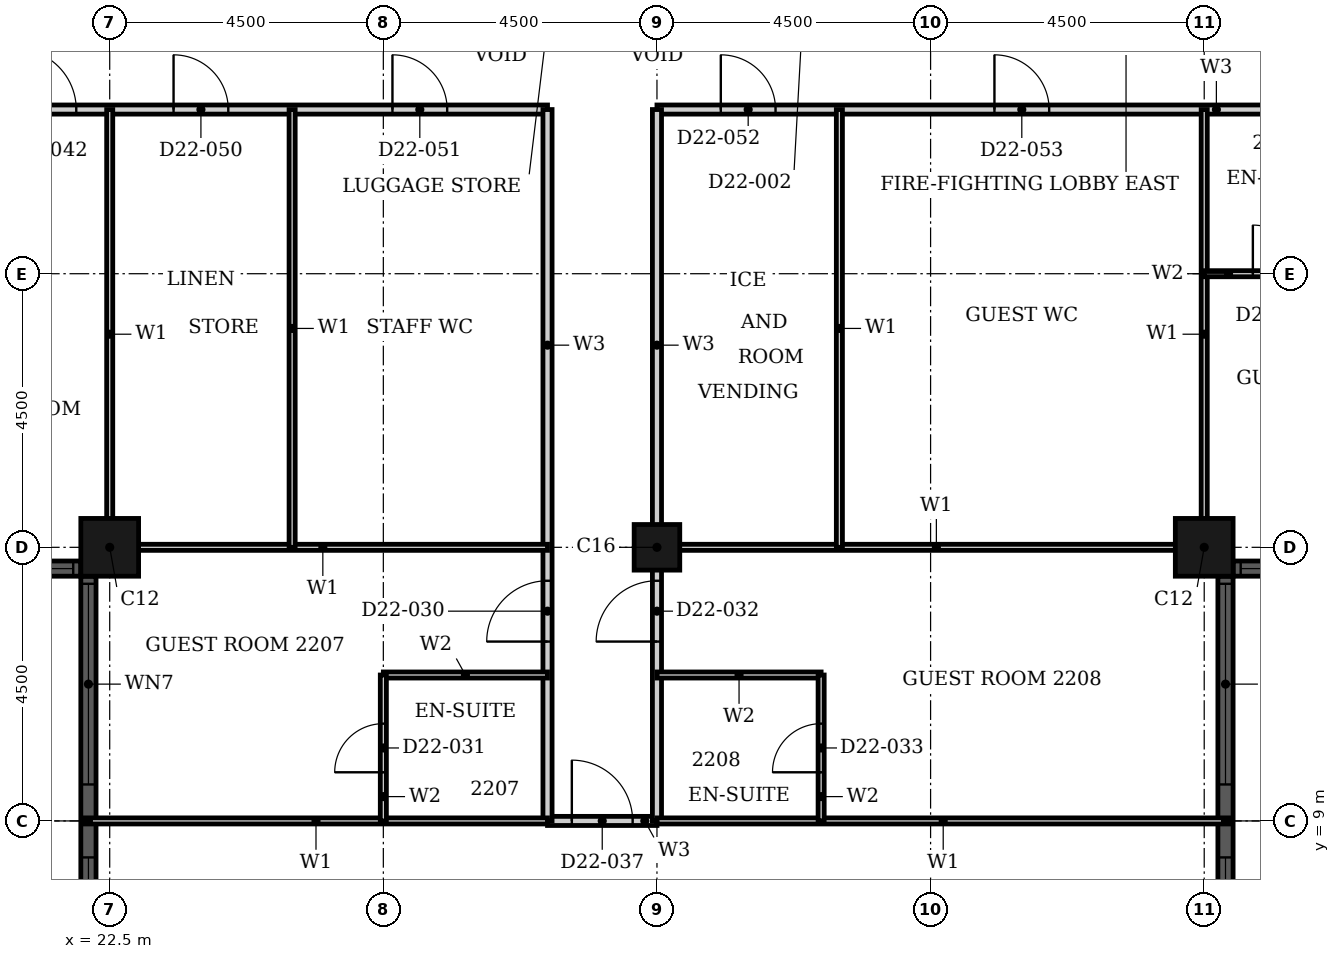
"""IFC4 building model, lengths in metres.
Left out: names, types, materials, properties, quantities, classifications, styles, units other than length and angle.
Written with IfcOpenShell. Run it as: python <this file> out.ifc"""

import sys

from ifc_helpers import new_model, si_unit, direction, frame, frame_2d, origin, origin_2d, place, context, subcontext, project, spatial, rectangle, hollow_rectangle, extrude, element, fill, save


model = new_model("IFC4")
c1 = context("Model", 3, precision=1e-05, world=origin(), true_north=direction((0.0, 1.0)))
c2 = subcontext(c1, "Body", "Model", "MODEL_VIEW")
j1 = project(units=[si_unit("LENGTHUNIT", "METRE"), si_unit("PLANEANGLEUNIT", "RADIAN")], contexts=[c1])
p1 = place(None, origin())
s1 = spatial("IfcSite", under=j1, at=p1, CompositionType="ELEMENT")
p2 = place(p1, origin())
s2 = spatial("IfcBuilding", under=s1, at=p2, CompositionType="ELEMENT")
p3 = place(p2, frame((0.0, 0.0, 92.4)))
s3 = spatial("IfcBuildingStorey", under=s2, at=p3, CompositionType="ELEMENT", Elevation=92.4)
for number, where, z_axis, x_axis in (
    (1, (40.5, 13.5, 0.0), (0.0, 0.0, 1.0), (1.0, 0.0, 0.0)),
    (2, (22.5, 13.5, 0.0), (0.0, 0.0, 1.0), (1.0, 0.0, 0.0)),
):
    element("IfcColumn", number, at=place(p3, frame(where, z_axis=z_axis, x_axis=x_axis)), inside=s3, PredefinedType="COLUMN", context=c2, shape_type="SweptSolid", body=[
        extrude(hollow_rectangle(XDim=0.95, YDim=0.95, WallThickness=0.03, at=origin_2d()), origin(), (0.0, 0.0, 1.0), 3.6),
    ])
p4 = place(p3, frame((31.5, 13.5, 0.0), z_axis=(0.0, 0.0, 1.0), x_axis=(1.0, 0.0, 0.0)))
e3 = element("IfcColumn", 3, at=p4, inside=s3, PredefinedType="COLUMN", context=c2, shape_type="SweptSolid", body=[
    extrude(hollow_rectangle(XDim=0.75, YDim=0.75, WallThickness=0.024, at=origin_2d()), origin(), (0.0, 0.0, 1.0), 3.6),
])
p5 = place(p3, frame((40.85, 4.975, 0.0), z_axis=(0.0, 0.0, 1.0), x_axis=(0.0, 1.0, 0.0)))
e4 = element("IfcWall", 4, at=p5, inside=s3, PredefinedType="SOLIDWALL", context=c2, shape_type="SweptSolid", body=[
    extrude(rectangle(XDim=8.05, YDim=0.25, at=frame_2d((4.025, 0.0))), origin(), (0.0, 0.0, 1.0), 3.6),
])
p6 = place(p5, frame((0.125, 0.0, 0.9)))
e5 = element("IfcOpeningElement", 5, at=p6, cuts=e4, PredefinedType="OPENING", context=c2, shape_type="SweptSolid", body=[
    extrude(rectangle(XDim=3.3, YDim=1.85, at=frame_2d((1.65, 0.925))), frame((0.0, 0.135, 0.0), z_axis=(0.0, -1.0, 0.0), x_axis=(1.0, 0.0, 0.0)), (0.0, 0.0, 1.0), 0.27),
])
p7 = place(p5, frame((4.625, 0.0, 0.9)))
e6 = element("IfcOpeningElement", 6, at=p7, cuts=e4, PredefinedType="OPENING", context=c2, shape_type="SweptSolid", body=[
    extrude(rectangle(XDim=3.3, YDim=1.85, at=frame_2d((1.65, 0.925))), frame((0.0, 0.135, 0.0), z_axis=(0.0, -1.0, 0.0), x_axis=(1.0, 0.0, 0.0)), (0.0, 0.0, 1.0), 0.27),
])
p8 = place(p3, frame((40.975, 13.15, 0.0), z_axis=(0.0, 0.0, 1.0), x_axis=(1.0, 0.0, 0.0)))
e7 = element("IfcWall", 7, at=p8, inside=s3, PredefinedType="SOLIDWALL", context=c2, shape_type="SweptSolid", body=[
    extrude(rectangle(XDim=3.55, YDim=0.25, at=frame_2d((1.775, 0.0))), origin(), (0.0, 0.0, 1.0), 3.6),
])
p9 = place(p8, frame((0.125, 0.0, 0.9)))
e8 = element("IfcOpeningElement", 8, at=p9, cuts=e7, PredefinedType="OPENING", context=c2, shape_type="SweptSolid", body=[
    extrude(rectangle(XDim=3.3, YDim=1.85, at=frame_2d((1.65, 0.925))), frame((0.0, 0.135, 0.0), z_axis=(0.0, -1.0, 0.0), x_axis=(1.0, 0.0, 0.0)), (0.0, 0.0, 1.0), 0.27),
])
p10 = place(p3, frame((18.475, 13.15, 0.0), z_axis=(0.0, 0.0, 1.0), x_axis=(1.0, 0.0, 0.0)))
e9 = element("IfcWall", 9, at=p10, inside=s3, PredefinedType="SOLIDWALL", context=c2, shape_type="SweptSolid", body=[
    extrude(rectangle(XDim=3.55, YDim=0.25, at=frame_2d((1.775, 0.0))), origin(), (0.0, 0.0, 1.0), 3.6),
])
p11 = place(p10, frame((0.125, 0.0, 0.9)))
e10 = element("IfcOpeningElement", 10, at=p11, cuts=e9, PredefinedType="OPENING", context=c2, shape_type="SweptSolid", body=[
    extrude(rectangle(XDim=3.3, YDim=1.85, at=frame_2d((1.65, 0.925))), frame((0.0, 0.135, 0.0), z_axis=(0.0, -1.0, 0.0), x_axis=(1.0, 0.0, 0.0)), (0.0, 0.0, 1.0), 0.27),
])
p12 = place(p3, frame((22.15, 13.025, 0.0), z_axis=(0.0, 0.0, 1.0), x_axis=(0.0, -1.0, 0.0)))
e11 = element("IfcWall", 11, at=p12, inside=s3, PredefinedType="SOLIDWALL", context=c2, shape_type="SweptSolid", body=[
    extrude(rectangle(XDim=8.05, YDim=0.25, at=frame_2d((4.025, 0.0))), origin(), (0.0, 0.0, 1.0), 3.6),
])
p13 = place(p12, frame((0.125, 0.0, 0.9)))
e12 = element("IfcOpeningElement", 12, at=p13, cuts=e11, PredefinedType="OPENING", context=c2, shape_type="SweptSolid", body=[
    extrude(rectangle(XDim=3.3, YDim=1.85, at=frame_2d((1.65, 0.925))), frame((0.0, 0.135, 0.0), z_axis=(0.0, -1.0, 0.0), x_axis=(1.0, 0.0, 0.0)), (0.0, 0.0, 1.0), 0.27),
])
p14 = place(p12, frame((4.625, 0.0, 0.9)))
e13 = element("IfcOpeningElement", 13, at=p14, cuts=e11, PredefinedType="OPENING", context=c2, shape_type="SweptSolid", body=[
    extrude(rectangle(XDim=3.3, YDim=1.85, at=frame_2d((1.65, 0.925))), frame((0.0, 0.135, 0.0), z_axis=(0.0, -1.0, 0.0), x_axis=(1.0, 0.0, 0.0)), (0.0, 0.0, 1.0), 0.27),
])
p15 = place(p3, frame((31.5, 20.7, 0.0), z_axis=(0.0, 0.0, 1.0), x_axis=(1.0, 0.0, 0.0)))
e14 = element("IfcWall", 14, at=p15, inside=s3, PredefinedType="PARTITIONING", context=c2, shape_type="SweptSolid", body=[
    extrude(rectangle(XDim=13.5, YDim=0.15, at=frame_2d((6.75, 0.0))), origin(), (0.0, 0.0, 1.0), 3.2),
])
p16 = place(p15, frame((11.95, 0.0, 0.0)))
e15 = element("IfcOpeningElement", 15, at=p16, cuts=e14, PredefinedType="OPENING", context=c2, shape_type="SweptSolid", body=[
    extrude(rectangle(XDim=1.0, YDim=2.1, at=frame_2d((0.5, 1.05))), frame((0.0, 0.085, 0.0), z_axis=(0.0, -1.0, 0.0), x_axis=(1.0, 0.0, 0.0)), (0.0, 0.0, 1.0), 0.17),
])
p17 = place(p15, frame((1.05, 0.0, 0.0)))
e16 = element("IfcOpeningElement", 16, at=p17, cuts=e14, PredefinedType="OPENING", context=c2, shape_type="SweptSolid", body=[
    extrude(rectangle(XDim=0.9, YDim=2.1, at=frame_2d((0.45, 1.05))), frame((0.0, 0.085, 0.0), z_axis=(0.0, -1.0, 0.0), x_axis=(1.0, 0.0, 0.0)), (0.0, 0.0, 1.0), 0.17),
])
p18 = place(p15, frame((5.55, 0.0, 0.0)))
e17 = element("IfcOpeningElement", 17, at=p18, cuts=e14, PredefinedType="OPENING", context=c2, shape_type="SweptSolid", body=[
    extrude(rectangle(XDim=0.9, YDim=2.1, at=frame_2d((0.45, 1.05))), frame((0.0, 0.085, 0.0), z_axis=(0.0, -1.0, 0.0), x_axis=(1.0, 0.0, 0.0)), (0.0, 0.0, 1.0), 0.17),
])
p19 = place(p3, frame((16.2, 20.7, 0.0), z_axis=(0.0, 0.0, 1.0), x_axis=(1.0, 0.0, 0.0)))
e18 = element("IfcWall", 18, at=p19, inside=s3, PredefinedType="PARTITIONING", context=c2, shape_type="SweptSolid", body=[
    extrude(rectangle(XDim=13.5, YDim=0.15, at=frame_2d((6.75, 0.0))), origin(), (0.0, 0.0, 1.0), 3.2),
])
p20 = place(p19, frame((4.75, 0.0, 0.0)))
e19 = element("IfcOpeningElement", 19, at=p20, cuts=e18, PredefinedType="OPENING", context=c2, shape_type="SweptSolid", body=[
    extrude(rectangle(XDim=1.0, YDim=2.1, at=frame_2d((0.5, 1.05))), frame((0.0, 0.085, 0.0), z_axis=(0.0, -1.0, 0.0), x_axis=(1.0, 0.0, 0.0)), (0.0, 0.0, 1.0), 0.17),
])
p21 = place(p19, frame((0.45, 0.0, 0.0)))
e20 = element("IfcOpeningElement", 20, at=p21, cuts=e18, PredefinedType="OPENING", context=c2, shape_type="SweptSolid", body=[
    extrude(rectangle(XDim=0.9, YDim=2.1, at=frame_2d((0.45, 1.05))), frame((0.0, 0.085, 0.0), z_axis=(0.0, -1.0, 0.0), x_axis=(1.0, 0.0, 0.0)), (0.0, 0.0, 1.0), 0.17),
])
p22 = place(p19, frame((7.35, 0.0, 0.0)))
e21 = element("IfcOpeningElement", 21, at=p22, cuts=e18, PredefinedType="OPENING", context=c2, shape_type="SweptSolid", body=[
    extrude(rectangle(XDim=0.9, YDim=2.1, at=frame_2d((0.45, 1.05))), frame((0.0, 0.085, 0.0), z_axis=(0.0, -1.0, 0.0), x_axis=(1.0, 0.0, 0.0)), (0.0, 0.0, 1.0), 0.17),
])
p23 = place(p19, frame((10.95, 0.0, 0.0)))
e22 = element("IfcOpeningElement", 22, at=p23, cuts=e18, PredefinedType="OPENING", context=c2, shape_type="SweptSolid", body=[
    extrude(rectangle(XDim=0.9, YDim=2.1, at=frame_2d((0.45, 1.05))), frame((0.0, 0.085, 0.0), z_axis=(0.0, -1.0, 0.0), x_axis=(1.0, 0.0, 0.0)), (0.0, 0.0, 1.0), 0.17),
])
p24 = place(p3, frame((29.7, 9.0, 0.0), z_axis=(0.0, 0.0, 1.0), x_axis=(1.0, 0.0, 0.0)))
e23 = element("IfcWall", 23, at=p24, inside=s3, PredefinedType="PARTITIONING", context=c2, shape_type="SweptSolid", body=[
    extrude(rectangle(XDim=1.8, YDim=0.15, at=frame_2d((0.9, 0.0))), origin(), (0.0, 0.0, 1.0), 3.2),
])
p25 = place(p24, frame((0.4, 0.0, 0.0)))
e24 = element("IfcOpeningElement", 24, at=p25, cuts=e23, PredefinedType="OPENING", context=c2, shape_type="SweptSolid", body=[
    extrude(rectangle(XDim=1.0, YDim=2.1, at=frame_2d((0.5, 1.05))), frame((0.0, 0.085, 0.0), z_axis=(0.0, -1.0, 0.0), x_axis=(1.0, 0.0, 0.0)), (0.0, 0.0, 1.0), 0.17),
])
p26 = place(p3, frame((29.7, 9.0, 0.0), z_axis=(0.0, 0.0, 1.0), x_axis=(0.0, 1.0, 0.0)))
e25 = element("IfcWall", 25, at=p26, inside=s3, PredefinedType="PARTITIONING", context=c2, shape_type="SweptSolid", body=[
    extrude(rectangle(XDim=11.7, YDim=0.15, at=frame_2d((5.85, 0.0))), origin(), (0.0, 0.0, 1.0), 3.2),
])
p27 = place(p26, frame((2.95, 0.0, 0.0)))
e26 = element("IfcOpeningElement", 26, at=p27, cuts=e25, PredefinedType="OPENING", context=c2, shape_type="SweptSolid", body=[
    extrude(rectangle(XDim=1.0, YDim=2.1, at=frame_2d((0.5, 1.05))), frame((0.0, 0.085, 0.0), z_axis=(0.0, -1.0, 0.0), x_axis=(1.0, 0.0, 0.0)), (0.0, 0.0, 1.0), 0.17),
])
p28 = place(p3, frame((31.5, 9.0, 0.0), z_axis=(0.0, 0.0, 1.0), x_axis=(0.0, 1.0, 0.0)))
e27 = element("IfcWall", 27, at=p28, inside=s3, PredefinedType="PARTITIONING", context=c2, shape_type="SweptSolid", body=[
    extrude(rectangle(XDim=11.7, YDim=0.15, at=frame_2d((5.85, 0.0))), origin(), (0.0, 0.0, 1.0), 2.48),
])
p29 = place(p28, frame((2.95, 0.0, 0.0)))
e28 = element("IfcOpeningElement", 28, at=p29, cuts=e27, PredefinedType="OPENING", context=c2, shape_type="SweptSolid", body=[
    extrude(rectangle(XDim=1.0, YDim=2.1, at=frame_2d((0.5, 1.05))), frame((0.0, 0.085, 0.0), z_axis=(0.0, -1.0, 0.0), x_axis=(1.0, 0.0, 0.0)), (0.0, 0.0, 1.0), 0.17),
])
p30 = place(p3, frame((31.5, 13.5, 0.0), z_axis=(0.0, 0.0, 1.0), x_axis=(1.0, 0.0, 0.0)))
e29 = element("IfcWall", 29, at=p30, inside=s3, PredefinedType="PARTITIONING", context=c2, shape_type="SweptSolid", body=[
    extrude(rectangle(XDim=9.19, YDim=0.1, at=frame_2d((4.595, 0.0))), origin(), (0.0, 0.0, 1.0), 2.28),
])
p31 = place(p3, frame((22.31, 13.5, 0.0), z_axis=(0.0, 0.0, 1.0), x_axis=(1.0, 0.0, 0.0)))
e30 = element("IfcWall", 30, at=p31, inside=s3, PredefinedType="PARTITIONING", context=c2, shape_type="SweptSolid", body=[
    extrude(rectangle(XDim=7.39, YDim=0.1, at=frame_2d((3.695, 0.0))), origin(), (0.0, 0.0, 1.0), 2.28),
])
p32 = place(p3, frame((31.5, 9.0, 0.0), z_axis=(0.0, 0.0, 1.0), x_axis=(1.0, 0.0, 0.0)))
e31 = element("IfcWall", 31, at=p32, inside=s3, PredefinedType="PARTITIONING", context=c2, shape_type="SweptSolid", body=[
    extrude(rectangle(XDim=9.415, YDim=0.1, at=frame_2d((4.708, 0.0))), origin(), (0.0, 0.0, 1.0), 3.2),
])
p33 = place(p3, frame((22.085, 9.0, 0.0), z_axis=(0.0, 0.0, 1.0), x_axis=(1.0, 0.0, 0.0)))
e32 = element("IfcWall", 32, at=p33, inside=s3, PredefinedType="PARTITIONING", context=c2, shape_type="SweptSolid", body=[
    extrude(rectangle(XDim=7.615, YDim=0.1, at=frame_2d((3.808, 0.0))), origin(), (0.0, 0.0, 1.0), 3.2),
])
p34 = place(p3, frame((22.5, 13.31, 0.0), z_axis=(0.0, 0.0, 1.0), x_axis=(0.0, 1.0, 0.0)))
e33 = element("IfcWall", 33, at=p34, inside=s3, PredefinedType="PARTITIONING", context=c2, shape_type="SweptSolid", body=[
    extrude(rectangle(XDim=7.39, YDim=0.1, at=frame_2d((3.695, 0.0))), origin(), (0.0, 0.0, 1.0), 3.2),
])
for number, where, z_axis, x_axis in (
    (34, (25.5, 13.5, 0.0), (0.0, 0.0, 1.0), (0.0, 1.0, 0.0)),
    (35, (34.5, 13.5, 0.0), (0.0, 0.0, 1.0), (0.0, 1.0, 0.0)),
):
    element("IfcWall", number, at=place(p3, frame(where, z_axis=z_axis, x_axis=x_axis)), inside=s3, PredefinedType="PARTITIONING", context=c2, shape_type="SweptSolid", body=[
        extrude(rectangle(XDim=7.2, YDim=0.1, at=frame_2d((3.6, 0.0))), origin(), (0.0, 0.0, 1.0), 3.2),
    ])
p35 = place(p3, frame((40.5, 13.31, 0.0), z_axis=(0.0, 0.0, 1.0), x_axis=(0.0, 1.0, 0.0)))
e36 = element("IfcWall", 36, at=p35, inside=s3, PredefinedType="PARTITIONING", context=c2, shape_type="SweptSolid", body=[
    extrude(rectangle(XDim=7.39, YDim=0.1, at=frame_2d((3.695, 0.0))), origin(), (0.0, 0.0, 1.0), 3.2),
])
for number, where, z_axis, x_axis in (
    (37, (31.5, 11.4, 0.0), (0.0, 0.0, 1.0), (1.0, 0.0, 0.0)),
    (38, (27.0, 11.4, 0.0), (0.0, 0.0, 1.0), (1.0, 0.0, 0.0)),
):
    element("IfcWall", number, at=place(p3, frame(where, z_axis=z_axis, x_axis=x_axis)), inside=s3, PredefinedType="PARTITIONING", context=c2, shape_type="SweptSolid", body=[
        extrude(rectangle(XDim=2.7, YDim=0.1, at=frame_2d((1.35, 0.0))), origin(), (0.0, 0.0, 1.0), 3.2),
    ])
p36 = place(p3, frame((40.5, 18.0, 0.0), z_axis=(0.0, 0.0, 1.0), x_axis=(1.0, 0.0, 0.0)))
e39 = element("IfcWall", 39, at=p36, inside=s3, PredefinedType="PARTITIONING", context=c2, shape_type="SweptSolid", body=[
    extrude(rectangle(XDim=2.4, YDim=0.1, at=frame_2d((1.2, 0.0))), origin(), (0.0, 0.0, 1.0), 3.2),
])
p37 = place(p36, frame((0.8, 0.0, 0.0)))
e40 = element("IfcOpeningElement", 40, at=p37, cuts=e39, PredefinedType="OPENING", context=c2, shape_type="SweptSolid", body=[
    extrude(rectangle(XDim=0.8, YDim=2.1, at=frame_2d((0.4, 1.05))), frame((0.0, 0.06, 0.0), z_axis=(0.0, -1.0, 0.0), x_axis=(1.0, 0.0, 0.0)), (0.0, 0.0, 1.0), 0.12),
])
p38 = place(p3, frame((27.0, 9.0, 0.0), z_axis=(0.0, 0.0, 1.0), x_axis=(0.0, 1.0, 0.0)))
e41 = element("IfcWall", 41, at=p38, inside=s3, PredefinedType="PARTITIONING", context=c2, shape_type="SweptSolid", body=[
    extrude(rectangle(XDim=2.4, YDim=0.1, at=frame_2d((1.2, 0.0))), origin(), (0.0, 0.0, 1.0), 2.48),
])
p39 = place(p38, frame((0.8, 0.0, 0.0)))
e42 = element("IfcOpeningElement", 42, at=p39, cuts=e41, PredefinedType="OPENING", context=c2, shape_type="SweptSolid", body=[
    extrude(rectangle(XDim=0.8, YDim=2.1, at=frame_2d((0.4, 1.05))), frame((0.0, 0.06, 0.0), z_axis=(0.0, -1.0, 0.0), x_axis=(1.0, 0.0, 0.0)), (0.0, 0.0, 1.0), 0.12),
])
p40 = place(p3, frame((34.2, 9.0, 0.0), z_axis=(0.0, 0.0, 1.0), x_axis=(0.0, 1.0, 0.0)))
e43 = element("IfcWall", 43, at=p40, inside=s3, PredefinedType="PARTITIONING", context=c2, shape_type="SweptSolid", body=[
    extrude(rectangle(XDim=2.4, YDim=0.1, at=frame_2d((1.2, 0.0))), origin(), (0.0, 0.0, 1.0), 3.2),
])
p41 = place(p40, frame((0.8, 0.0, 0.0)))
e44 = element("IfcOpeningElement", 44, at=p41, cuts=e43, PredefinedType="OPENING", context=c2, shape_type="SweptSolid", body=[
    extrude(rectangle(XDim=0.8, YDim=2.1, at=frame_2d((0.4, 1.05))), frame((0.0, 0.06, 0.0), z_axis=(0.0, -1.0, 0.0), x_axis=(1.0, 0.0, 0.0)), (0.0, 0.0, 1.0), 0.12),
])
p42 = place(p6, origin())
e45 = element("IfcWindow", 45, at=p42, inside=s3, PartitioningType="SINGLE_PANEL", PredefinedType="WINDOW", context=c2, shape_type="SweptSolid", body=[
    extrude(rectangle(XDim=3.3, YDim=1.85, at=frame_2d((1.65, 0.925))), frame((0.0, 0.03, 0.0), z_axis=(0.0, -1.0, 0.0), x_axis=(1.0, 0.0, 0.0)), (0.0, 0.0, 1.0), 0.06),
])
fill(e5, e45)
p43 = place(p7, origin())
e46 = element("IfcWindow", 46, at=p43, inside=s3, PartitioningType="SINGLE_PANEL", PredefinedType="WINDOW", context=c2, shape_type="SweptSolid", body=[
    extrude(rectangle(XDim=3.3, YDim=1.85, at=frame_2d((1.65, 0.925))), frame((0.0, 0.03, 0.0), z_axis=(0.0, -1.0, 0.0), x_axis=(1.0, 0.0, 0.0)), (0.0, 0.0, 1.0), 0.06),
])
fill(e6, e46)
p44 = place(p9, origin())
e47 = element("IfcWindow", 47, at=p44, inside=s3, PartitioningType="SINGLE_PANEL", PredefinedType="WINDOW", context=c2, shape_type="SweptSolid", body=[
    extrude(rectangle(XDim=3.3, YDim=1.85, at=frame_2d((1.65, 0.925))), frame((0.0, 0.03, 0.0), z_axis=(0.0, -1.0, 0.0), x_axis=(1.0, 0.0, 0.0)), (0.0, 0.0, 1.0), 0.06),
])
fill(e8, e47)
p45 = place(p11, origin())
e48 = element("IfcWindow", 48, at=p45, inside=s3, PartitioningType="SINGLE_PANEL", PredefinedType="WINDOW", context=c2, shape_type="SweptSolid", body=[
    extrude(rectangle(XDim=3.3, YDim=1.85, at=frame_2d((1.65, 0.925))), frame((0.0, 0.03, 0.0), z_axis=(0.0, -1.0, 0.0), x_axis=(1.0, 0.0, 0.0)), (0.0, 0.0, 1.0), 0.06),
])
fill(e10, e48)
p46 = place(p13, origin())
e49 = element("IfcWindow", 49, at=p46, inside=s3, PartitioningType="SINGLE_PANEL", PredefinedType="WINDOW", context=c2, shape_type="SweptSolid", body=[
    extrude(rectangle(XDim=3.3, YDim=1.85, at=frame_2d((1.65, 0.925))), frame((0.0, 0.03, 0.0), z_axis=(0.0, -1.0, 0.0), x_axis=(1.0, 0.0, 0.0)), (0.0, 0.0, 1.0), 0.06),
])
fill(e12, e49)
p47 = place(p14, origin())
e50 = element("IfcWindow", 50, at=p47, inside=s3, PartitioningType="SINGLE_PANEL", PredefinedType="WINDOW", context=c2, shape_type="SweptSolid", body=[
    extrude(rectangle(XDim=3.3, YDim=1.85, at=frame_2d((1.65, 0.925))), frame((0.0, 0.03, 0.0), z_axis=(0.0, -1.0, 0.0), x_axis=(1.0, 0.0, 0.0)), (0.0, 0.0, 1.0), 0.06),
])
fill(e13, e50)
p48 = place(p27, origin())
e51 = element("IfcDoor", 51, at=p48, inside=s3, OperationType="SINGLE_SWING_RIGHT", PredefinedType="DOOR", context=c2, shape_type="SweptSolid", body=[
    extrude(rectangle(XDim=1.0, YDim=2.1, at=frame_2d((0.5, 1.05))), frame((0.0, 0.025, 0.0), z_axis=(0.0, -1.0, 0.0), x_axis=(1.0, 0.0, 0.0)), (0.0, 0.0, 1.0), 0.05),
])
fill(e26, e51)
p49 = place(p39, origin())
e52 = element("IfcDoor", 52, at=p49, inside=s3, OperationType="SINGLE_SWING_LEFT", PredefinedType="DOOR", context=c2, shape_type="SweptSolid", body=[
    extrude(rectangle(XDim=0.8, YDim=2.1, at=frame_2d((0.4, 1.05))), frame((0.0, 0.025, 0.0), z_axis=(0.0, -1.0, 0.0), x_axis=(1.0, 0.0, 0.0)), (0.0, 0.0, 1.0), 0.05),
])
fill(e42, e52)
p50 = place(p29, origin())
e53 = element("IfcDoor", 53, at=p50, inside=s3, OperationType="SINGLE_SWING_RIGHT", PredefinedType="DOOR", context=c2, shape_type="SweptSolid", body=[
    extrude(rectangle(XDim=1.0, YDim=2.1, at=frame_2d((0.5, 1.05))), frame((0.0, 0.025, 0.0), z_axis=(0.0, -1.0, 0.0), x_axis=(1.0, 0.0, 0.0)), (0.0, 0.0, 1.0), 0.05),
])
fill(e28, e53)
p51 = place(p41, origin())
e54 = element("IfcDoor", 54, at=p51, inside=s3, OperationType="SINGLE_SWING_LEFT", PredefinedType="DOOR", context=c2, shape_type="SweptSolid", body=[
    extrude(rectangle(XDim=0.8, YDim=2.1, at=frame_2d((0.4, 1.05))), frame((0.0, 0.025, 0.0), z_axis=(0.0, -1.0, 0.0), x_axis=(1.0, 0.0, 0.0)), (0.0, 0.0, 1.0), 0.05),
])
fill(e44, e54)
p52 = place(p25, origin())
e55 = element("IfcDoor", 55, at=p52, inside=s3, OperationType="SINGLE_SWING_LEFT", PredefinedType="DOOR", context=c2, shape_type="SweptSolid", body=[
    extrude(rectangle(XDim=1.0, YDim=2.1, at=frame_2d((0.5, 1.05))), frame((0.0, 0.025, 0.0), z_axis=(0.0, -1.0, 0.0), x_axis=(1.0, 0.0, 0.0)), (0.0, 0.0, 1.0), 0.05),
])
fill(e24, e55)
p53 = place(p20, origin())
e56 = element("IfcDoor", 56, at=p53, inside=s3, OperationType="SINGLE_SWING_RIGHT", PredefinedType="DOOR", context=c2, shape_type="SweptSolid", body=[
    extrude(rectangle(XDim=1.0, YDim=2.1, at=frame_2d((0.5, 1.05))), frame((0.0, 0.025, 0.0), z_axis=(0.0, -1.0, 0.0), x_axis=(1.0, 0.0, 0.0)), (0.0, 0.0, 1.0), 0.05),
])
fill(e19, e56)
p54 = place(p37, origin())
e57 = element("IfcDoor", 57, at=p54, inside=s3, OperationType="SINGLE_SWING_RIGHT", PredefinedType="DOOR", context=c2, shape_type="SweptSolid", body=[
    extrude(rectangle(XDim=0.8, YDim=2.1, at=frame_2d((0.4, 1.05))), frame((0.0, 0.025, 0.0), z_axis=(0.0, -1.0, 0.0), x_axis=(1.0, 0.0, 0.0)), (0.0, 0.0, 1.0), 0.05),
])
fill(e40, e57)
p55 = place(p22, origin())
e58 = element("IfcDoor", 58, at=p55, inside=s3, OperationType="SINGLE_SWING_RIGHT", PredefinedType="DOOR", context=c2, shape_type="SweptSolid", body=[
    extrude(rectangle(XDim=0.9, YDim=2.1, at=frame_2d((0.45, 1.05))), frame((0.0, 0.025, 0.0), z_axis=(0.0, -1.0, 0.0), x_axis=(1.0, 0.0, 0.0)), (0.0, 0.0, 1.0), 0.05),
])
fill(e21, e58)
p56 = place(p23, origin())
e59 = element("IfcDoor", 59, at=p56, inside=s3, OperationType="SINGLE_SWING_RIGHT", PredefinedType="DOOR", context=c2, shape_type="SweptSolid", body=[
    extrude(rectangle(XDim=0.9, YDim=2.1, at=frame_2d((0.45, 1.05))), frame((0.0, 0.025, 0.0), z_axis=(0.0, -1.0, 0.0), x_axis=(1.0, 0.0, 0.0)), (0.0, 0.0, 1.0), 0.05),
])
fill(e22, e59)
p57 = place(p17, origin())
e60 = element("IfcDoor", 60, at=p57, inside=s3, OperationType="SINGLE_SWING_RIGHT", PredefinedType="DOOR", context=c2, shape_type="SweptSolid", body=[
    extrude(rectangle(XDim=0.9, YDim=2.1, at=frame_2d((0.45, 1.05))), frame((0.0, 0.025, 0.0), z_axis=(0.0, -1.0, 0.0), x_axis=(1.0, 0.0, 0.0)), (0.0, 0.0, 1.0), 0.05),
])
fill(e16, e60)
p58 = place(p18, origin())
e61 = element("IfcDoor", 61, at=p58, inside=s3, OperationType="SINGLE_SWING_LEFT", PredefinedType="DOOR", context=c2, shape_type="SweptSolid", body=[
    extrude(rectangle(XDim=0.9, YDim=2.1, at=frame_2d((0.45, 1.05))), frame((0.0, 0.025, 0.0), z_axis=(0.0, -1.0, 0.0), x_axis=(1.0, 0.0, 0.0)), (0.0, 0.0, 1.0), 0.05),
])
fill(e17, e61)
save(model, sys.argv[1])
